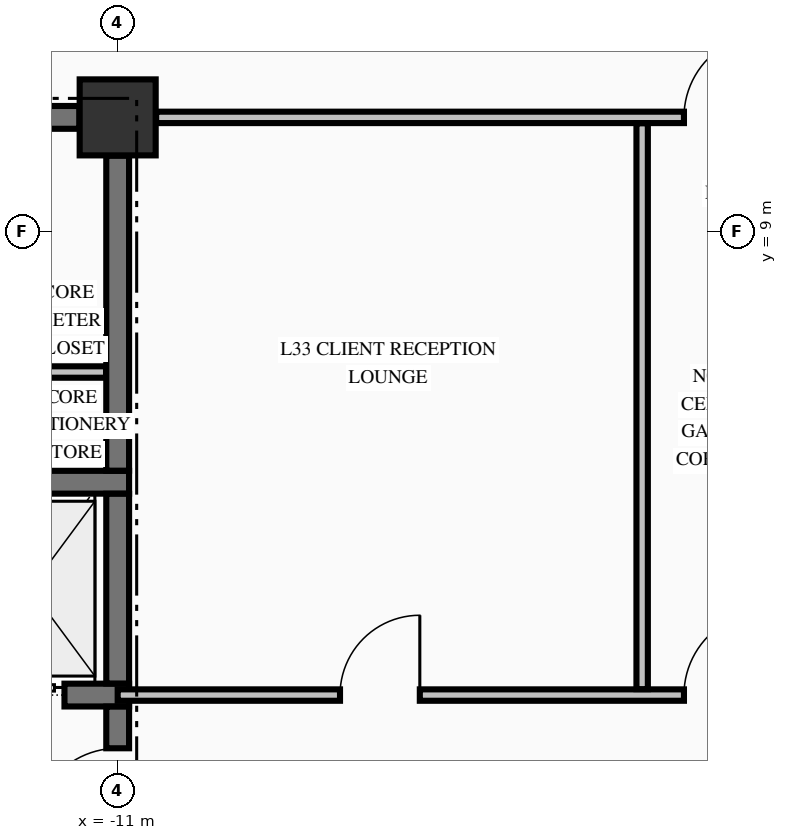
"""IFC4 building model, lengths in metres.
Left out: names, types, materials, properties, quantities, classifications, styles, units other than length and angle.
Written with IfcOpenShell. Run it as: python <this file> out.ifc"""

import sys

from ifc_helpers import new_model, si_unit, direction, frame, frame_2d, origin, origin_2d, place, context, subcontext, project, spatial, rectangle, extrude, element, fill, save


model = new_model("IFC4")
c1 = context("Model", 3, precision=1e-05, world=origin(), true_north=direction((0.0, 1.0)))
c2 = subcontext(c1, "Body", "Model", "MODEL_VIEW")
j1 = project(units=[si_unit("LENGTHUNIT", "METRE"), si_unit("PLANEANGLEUNIT", "RADIAN")], contexts=[c1])
p1 = place(None, origin())
s1 = spatial("IfcSite", under=j1, at=p1, CompositionType="ELEMENT")
p2 = place(p1, origin())
s2 = spatial("IfcBuilding", under=s1, at=p2, CompositionType="ELEMENT")
p3 = place(p2, frame((0.0, 0.0, 132.06)))
s3 = spatial("IfcBuildingStorey", under=s2, at=p3, CompositionType="ELEMENT", Elevation=132.06)
p4 = place(p3, frame((-11.0, 10.5, -0.25), z_axis=(0.0, 0.0, 1.0), x_axis=(1.0, 0.0, 0.0)))
e1 = element("IfcColumn", 1, at=p4, inside=s3, PredefinedType="COLUMN", context=c2, shape_type="SweptSolid", body=[
    extrude(rectangle(XDim=1.0, YDim=1.0, at=origin_2d()), origin(), (0.0, 0.0, 1.0), 3.57),
])
p5 = place(p3, frame((-14.875, 2.9, 0.0), z_axis=(0.0, 0.0, 1.0), x_axis=(1.0, 0.0, 0.0)))
e2 = element("IfcWall", 2, at=p5, inside=s3, PredefinedType="SHEAR", context=c2, shape_type="SweptSolid", body=[
    extrude(rectangle(XDim=4.025, YDim=0.3, at=frame_2d((2.012, 0.0))), origin(), (0.0, 0.0, 1.0), 3.32),
])
p6 = place(p5, frame((2.075, 0.0, 0.0)))
e3 = element("IfcOpeningElement", 3, at=p6, cuts=e2, PredefinedType="OPENING", context=c2, shape_type="SweptSolid", body=[
    extrude(rectangle(XDim=1.1, YDim=2.2, at=frame_2d((0.55, 1.1))), frame((0.0, 0.16, 0.0), z_axis=(0.0, -1.0, 0.0), x_axis=(1.0, 0.0, 0.0)), (0.0, 0.0, 1.0), 0.32),
])
p7 = place(p3, frame((-14.875, 5.7, 0.0), z_axis=(0.0, 0.0, 1.0), x_axis=(1.0, 0.0, 0.0)))
e4 = element("IfcWall", 4, at=p7, inside=s3, PredefinedType="SHEAR", context=c2, shape_type="SweptSolid", body=[
    extrude(rectangle(XDim=4.025, YDim=0.3, at=frame_2d((2.012, 0.0))), origin(), (0.0, 0.0, 1.0), 3.32),
])
p8 = place(p3, frame((-14.7, 10.5, 0.0), z_axis=(0.0, 0.0, 1.0), x_axis=(1.0, 0.0, 0.0)))
e5 = element("IfcWall", 5, at=p8, inside=s3, PredefinedType="SHEAR", context=c2, shape_type="SweptSolid", body=[
    extrude(rectangle(XDim=3.196, YDim=0.3, at=frame_2d((1.598, 0.0))), origin(), (0.0, 0.0, 1.0), 3.32),
])
p9 = place(p8, frame((0.305, 0.0, 0.0)))
e6 = element("IfcOpeningElement", 6, at=p9, cuts=e5, PredefinedType="OPENING", context=c2, shape_type="SweptSolid", body=[
    extrude(rectangle(XDim=0.95, YDim=2.15, at=frame_2d((0.475, 1.075))), frame((0.0, 0.16, 0.0), z_axis=(0.0, -1.0, 0.0), x_axis=(1.0, 0.0, 0.0)), (0.0, 0.0, 1.0), 0.32),
])
p10 = place(p3, frame((-11.0, 2.9, 0.0), z_axis=(0.0, 0.0, 1.0), x_axis=(1.0, 0.0, 0.0)))
e7 = element("IfcWall", 7, at=p10, inside=s3, PredefinedType="PARTITIONING", context=c2, shape_type="SweptSolid", body=[
    extrude(rectangle(XDim=22.0, YDim=0.15, at=frame_2d((11.0, 0.0))), origin(), (0.0, 0.0, 1.0), 3.32),
])
p11 = place(p10, frame((7.45, 0.0, 0.0)))
e8 = element("IfcOpeningElement", 8, at=p11, cuts=e7, PredefinedType="OPENING", context=c2, shape_type="SweptSolid", body=[
    extrude(rectangle(XDim=1.1, YDim=2.15, at=frame_2d((0.55, 1.075))), frame((0.0, 0.085, 0.0), z_axis=(0.0, -1.0, 0.0), x_axis=(1.0, 0.0, 0.0)), (0.0, 0.0, 1.0), 0.17),
])
p12 = place(p10, frame((2.925, 0.0, 0.0)))
e9 = element("IfcOpeningElement", 9, at=p12, cuts=e7, PredefinedType="OPENING", context=c2, shape_type="SweptSolid", body=[
    extrude(rectangle(XDim=1.05, YDim=2.15, at=frame_2d((0.525, 1.075))), frame((0.0, 0.085, 0.0), z_axis=(0.0, -1.0, 0.0), x_axis=(1.0, 0.0, 0.0)), (0.0, 0.0, 1.0), 0.17),
])
p13 = place(p10, frame((11.275, 0.0, 0.0)))
e10 = element("IfcOpeningElement", 10, at=p13, cuts=e7, PredefinedType="OPENING", context=c2, shape_type="SweptSolid", body=[
    extrude(rectangle(XDim=0.95, YDim=2.15, at=frame_2d((0.475, 1.075))), frame((0.0, 0.085, 0.0), z_axis=(0.0, -1.0, 0.0), x_axis=(1.0, 0.0, 0.0)), (0.0, 0.0, 1.0), 0.17),
])
p14 = place(p10, frame((17.725, 0.0, 0.0)))
e11 = element("IfcOpeningElement", 11, at=p14, cuts=e7, PredefinedType="OPENING", context=c2, shape_type="SweptSolid", body=[
    extrude(rectangle(XDim=0.95, YDim=2.15, at=frame_2d((0.475, 1.075))), frame((0.0, 0.085, 0.0), z_axis=(0.0, -1.0, 0.0), x_axis=(1.0, 0.0, 0.0)), (0.0, 0.0, 1.0), 0.17),
])
p15 = place(p3, frame((-13.225, 7.15, 0.0), z_axis=(0.0, 0.0, 1.0), x_axis=(1.0, 0.0, 0.0)))
e12 = element("IfcWall", 12, at=p15, inside=s3, PredefinedType="PARTITIONING", context=c2, shape_type="SweptSolid", body=[
    extrude(rectangle(XDim=2.072, YDim=0.15, at=frame_2d((1.036, 0.0))), origin(), (0.0, 0.0, 1.0), 3.32),
])
p16 = place(p3, frame((-10.494, 10.5, 0.0), z_axis=(0.0, 0.0, 1.0), x_axis=(1.0, 0.0, 0.0)))
e13 = element("IfcWall", 13, at=p16, inside=s3, PredefinedType="PARTITIONING", context=c2, shape_type="SweptSolid", body=[
    extrude(rectangle(XDim=20.988, YDim=0.15, at=frame_2d((10.494, 0.0))), origin(), (0.0, 0.0, 1.0), 3.32),
])
p17 = place(p16, frame((6.944, 0.0, 0.0)))
e14 = element("IfcOpeningElement", 14, at=p17, cuts=e13, PredefinedType="OPENING", context=c2, shape_type="SweptSolid", body=[
    extrude(rectangle(XDim=1.1, YDim=2.15, at=frame_2d((0.55, 1.075))), frame((0.0, 0.085, 0.0), z_axis=(0.0, -1.0, 0.0), x_axis=(1.0, 0.0, 0.0)), (0.0, 0.0, 1.0), 0.17),
])
p18 = place(p3, frame((-11.0, 0.504, 0.0), z_axis=(0.0, 0.0, 1.0), x_axis=(0.0, 1.0, 0.0)))
e15 = element("IfcWall", 15, at=p18, inside=s3, PredefinedType="SHEAR", context=c2, shape_type="SweptSolid", body=[
    extrude(rectangle(XDim=2.244, YDim=0.3, at=frame_2d((1.122, 0.0))), origin(), (0.0, 0.0, 1.0), 3.32),
])
p19 = place(p18, frame((0.596, 0.0, 0.0)))
e16 = element("IfcOpeningElement", 16, at=p19, cuts=e15, PredefinedType="OPENING", context=c2, shape_type="SweptSolid", body=[
    extrude(rectangle(XDim=1.1, YDim=2.15, at=frame_2d((0.55, 1.075))), frame((0.0, 0.16, 0.0), z_axis=(0.0, -1.0, 0.0), x_axis=(1.0, 0.0, 0.0)), (0.0, 0.0, 1.0), 0.32),
])
p20 = place(p3, frame((-11.0, 3.052, 0.0), z_axis=(0.0, 0.0, 1.0), x_axis=(0.0, 1.0, 0.0)))
e17 = element("IfcWall", 17, at=p20, inside=s3, PredefinedType="SHEAR", context=c2, shape_type="SweptSolid", body=[
    extrude(rectangle(XDim=2.496, YDim=0.3, at=frame_2d((1.248, 0.0))), origin(), (0.0, 0.0, 1.0), 3.32),
])
p21 = place(p3, frame((-11.0, 5.852, 0.0), z_axis=(0.0, 0.0, 1.0), x_axis=(0.0, 1.0, 0.0)))
e18 = element("IfcWall", 18, at=p21, inside=s3, PredefinedType="SHEAR", context=c2, shape_type="SweptSolid", body=[
    extrude(rectangle(XDim=4.144, YDim=0.3, at=frame_2d((2.072, 0.0))), origin(), (0.0, 0.0, 1.0), 3.32),
])
p22 = place(p3, frame((-4.1, 2.978, 0.0), z_axis=(0.0, 0.0, 1.0), x_axis=(0.0, 1.0, 0.0)))
e19 = element("IfcWall", 19, at=p22, inside=s3, PredefinedType="PARTITIONING", context=c2, shape_type="SweptSolid", body=[
    extrude(rectangle(XDim=7.444, YDim=0.15, at=frame_2d((3.722, 0.0))), origin(), (0.0, 0.0, 1.0), 3.32),
])
p23 = place(p19, origin())
e20 = element("IfcDoor", 20, at=p23, inside=s3, OperationType="SINGLE_SWING_LEFT", PredefinedType="DOOR", context=c2, shape_type="SweptSolid", body=[
    extrude(rectangle(XDim=1.1, YDim=2.15, at=frame_2d((0.55, 1.075))), frame((0.0, 0.025, 0.0), z_axis=(0.0, -1.0, 0.0), x_axis=(1.0, 0.0, 0.0)), (0.0, 0.0, 1.0), 0.05),
])
fill(e16, e20)
p24 = place(p6, origin())
e21 = element("IfcDoor", 21, at=p24, inside=s3, OperationType="SLIDING_TO_LEFT", PredefinedType="DOOR", context=c2, shape_type="SweptSolid", body=[
    extrude(rectangle(XDim=1.1, YDim=2.2, at=frame_2d((0.55, 1.1))), frame((0.0, 0.025, 0.0), z_axis=(0.0, -1.0, 0.0), x_axis=(1.0, 0.0, 0.0)), (0.0, 0.0, 1.0), 0.05),
])
fill(e3, e21)
p25 = place(p17, origin())
e22 = element("IfcDoor", 22, at=p25, inside=s3, OperationType="SINGLE_SWING_RIGHT", PredefinedType="DOOR", context=c2, shape_type="SweptSolid", body=[
    extrude(rectangle(XDim=1.1, YDim=2.15, at=frame_2d((0.55, 1.075))), frame((0.0, 0.025, 0.0), z_axis=(0.0, -1.0, 0.0), x_axis=(1.0, 0.0, 0.0)), (0.0, 0.0, 1.0), 0.05),
])
fill(e14, e22)
p26 = place(p11, origin())
e23 = element("IfcDoor", 23, at=p26, inside=s3, OperationType="SINGLE_SWING_RIGHT", PredefinedType="DOOR", context=c2, shape_type="SweptSolid", body=[
    extrude(rectangle(XDim=1.1, YDim=2.15, at=frame_2d((0.55, 1.075))), frame((0.0, 0.025, 0.0), z_axis=(0.0, -1.0, 0.0), x_axis=(1.0, 0.0, 0.0)), (0.0, 0.0, 1.0), 0.05),
])
fill(e8, e23)
p27 = place(p12, origin())
e24 = element("IfcDoor", 24, at=p27, inside=s3, OperationType="SINGLE_SWING_RIGHT", PredefinedType="DOOR", context=c2, shape_type="SweptSolid", body=[
    extrude(rectangle(XDim=1.05, YDim=2.15, at=frame_2d((0.525, 1.075))), frame((0.0, 0.025, 0.0), z_axis=(0.0, -1.0, 0.0), x_axis=(1.0, 0.0, 0.0)), (0.0, 0.0, 1.0), 0.05),
])
fill(e9, e24)
save(model, sys.argv[1])
